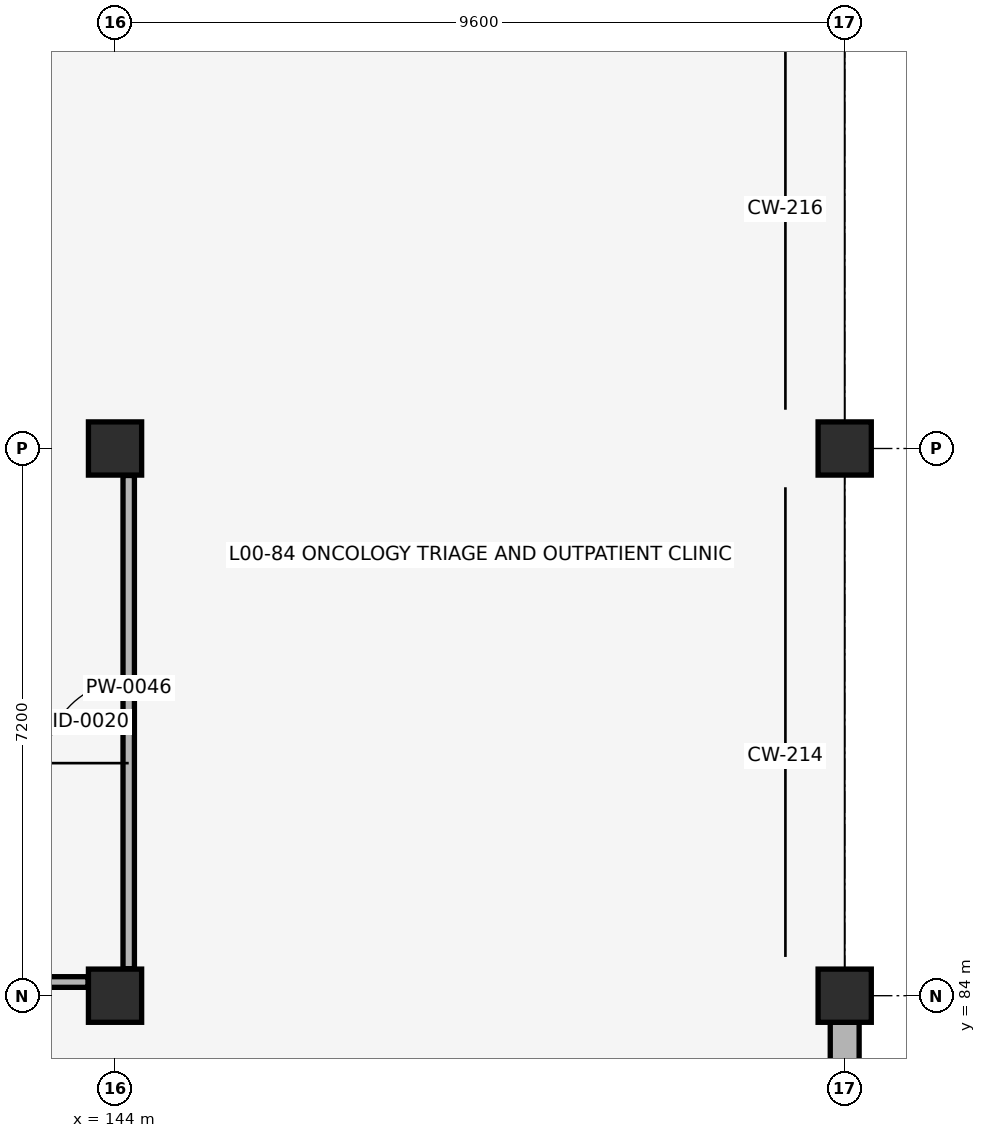
"""IFC4 building model, lengths in metres.
Left out: names, types, materials, properties, quantities, classifications, styles, units other than length and angle.
Written with IfcOpenShell. Run it as: python <this file> out.ifc"""

import sys

from ifc_helpers import new_model, si_unit, direction, frame, frame_2d, origin, origin_2d, place, context, subcontext, project, spatial, rectangle, circle, extrude, element, fill, save


model = new_model("IFC4")
c1 = context("Model", 3, precision=1e-05, world=origin(), true_north=direction((0.0, 1.0)))
c2 = subcontext(c1, "Body", "Model", "MODEL_VIEW")
j1 = project(units=[si_unit("LENGTHUNIT", "METRE"), si_unit("PLANEANGLEUNIT", "RADIAN")], contexts=[c1])
p1 = place(None, origin())
s1 = spatial("IfcSite", under=j1, at=p1, CompositionType="ELEMENT")
p2 = place(p1, origin())
s2 = spatial("IfcBuilding", under=s1, at=p2, CompositionType="ELEMENT")
p3 = place(p2, origin())
s3 = spatial("IfcBuildingStorey", under=s2, at=p3, CompositionType="ELEMENT", Elevation=0.0)
for number, where, z_axis, x_axis in (
    (1, (144.0, 84.0, -0.44), (0.0, 0.0, 1.0), (1.0, 0.0, 0.0)),
    (2, (144.0, 91.2, -0.44), (0.0, 0.0, 1.0), (1.0, 0.0, 0.0)),
    (3, (153.6, 84.0, -0.44), (0.0, 0.0, 1.0), (1.0, 0.0, 0.0)),
    (4, (153.6, 91.2, -0.44), (0.0, 0.0, 1.0), (1.0, 0.0, 0.0)),
):
    element("IfcColumn", number, at=place(p3, frame(where, z_axis=z_axis, x_axis=x_axis)), inside=s3, PredefinedType="COLUMN", context=c2, shape_type="SweptSolid", body=[
        extrude(circle(Radius=0.35, at=origin_2d()), origin(), (0.0, 0.0, 1.0), 4.86),
    ])
p4 = place(p3, frame((153.6, 77.15, 0.0), z_axis=(0.0, 0.0, 1.0), x_axis=(0.0, 1.0, 0.0)))
e5 = element("IfcWall", 5, at=p4, inside=s3, PredefinedType="SOLIDWALL", context=c2, shape_type="SweptSolid", body=[
    extrude(rectangle(XDim=6.5, YDim=0.38, at=frame_2d((3.25, 0.0))), origin(), (0.0, 0.0, 1.0), 3.37),
])
p5 = place(p4, frame((2.25, 0.0, 0.0)))
e6 = element("IfcOpeningElement", 6, at=p5, cuts=e5, PredefinedType="OPENING", context=c2, shape_type="SweptSolid", body=[
    extrude(rectangle(XDim=2.0, YDim=2.3, at=frame_2d((1.0, 1.15))), frame((0.0, 0.2, 0.0), z_axis=(0.0, -1.0, 0.0), x_axis=(1.0, 0.0, 0.0)), (0.0, 0.0, 1.0), 0.4),
])
p6 = place(p3, frame((134.755, 84.18, 0.0), z_axis=(0.0, 0.0, 1.0), x_axis=(1.0, 0.0, 0.0)))
e7 = element("IfcWall", 7, at=p6, inside=s3, PredefinedType="PARTITIONING", context=c2, shape_type="SweptSolid", body=[
    extrude(rectangle(XDim=8.89, YDim=0.14, at=frame_2d((4.445, 0.0))), origin(), (0.0, 0.0, 1.0), 3.46),
])
p7 = place(p6, frame((3.62, 0.0, 0.0)))
e8 = element("IfcOpeningElement", 8, at=p7, cuts=e7, PredefinedType="OPENING", context=c2, shape_type="SweptSolid", body=[
    extrude(rectangle(XDim=1.65, YDim=2.15, at=frame_2d((0.825, 1.075))), frame((0.0, 0.08, 0.0), z_axis=(0.0, -1.0, 0.0), x_axis=(1.0, 0.0, 0.0)), (0.0, 0.0, 1.0), 0.16),
])
p8 = place(p3, frame((144.18, 84.355, 0.0), z_axis=(0.0, 0.0, 1.0), x_axis=(0.0, 1.0, 0.0)))
e9 = element("IfcWall", 9, at=p8, inside=s3, PredefinedType="PARTITIONING", context=c2, shape_type="SweptSolid", body=[
    extrude(rectangle(XDim=6.49, YDim=0.15, at=frame_2d((3.245, 0.0))), origin(), (0.0, 0.0, 1.0), 3.46),
])
p9 = place(p8, frame((2.705, 0.0, 0.0)))
e10 = element("IfcOpeningElement", 10, at=p9, cuts=e9, PredefinedType="OPENING", context=c2, shape_type="SweptSolid", body=[
    extrude(rectangle(XDim=1.08, YDim=2.1, at=frame_2d((0.54, 1.05))), frame((0.0, 0.085, 0.0), z_axis=(0.0, -1.0, 0.0), x_axis=(1.0, 0.0, 0.0)), (0.0, 0.0, 1.0), 0.17),
])
p10 = place(p9, origin())
e11 = element("IfcDoor", 11, at=p10, inside=s3, OperationType="SINGLE_SWING_LEFT", PredefinedType="DOOR", context=c2, shape_type="SweptSolid", body=[
    extrude(rectangle(XDim=1.08, YDim=2.1, at=frame_2d((0.54, 1.05))), frame((0.0, 0.025, 0.0), z_axis=(0.0, -1.0, 0.0), x_axis=(1.0, 0.0, 0.0)), (0.0, 0.0, 1.0), 0.05),
])
fill(e10, e11)
save(model, sys.argv[1])
